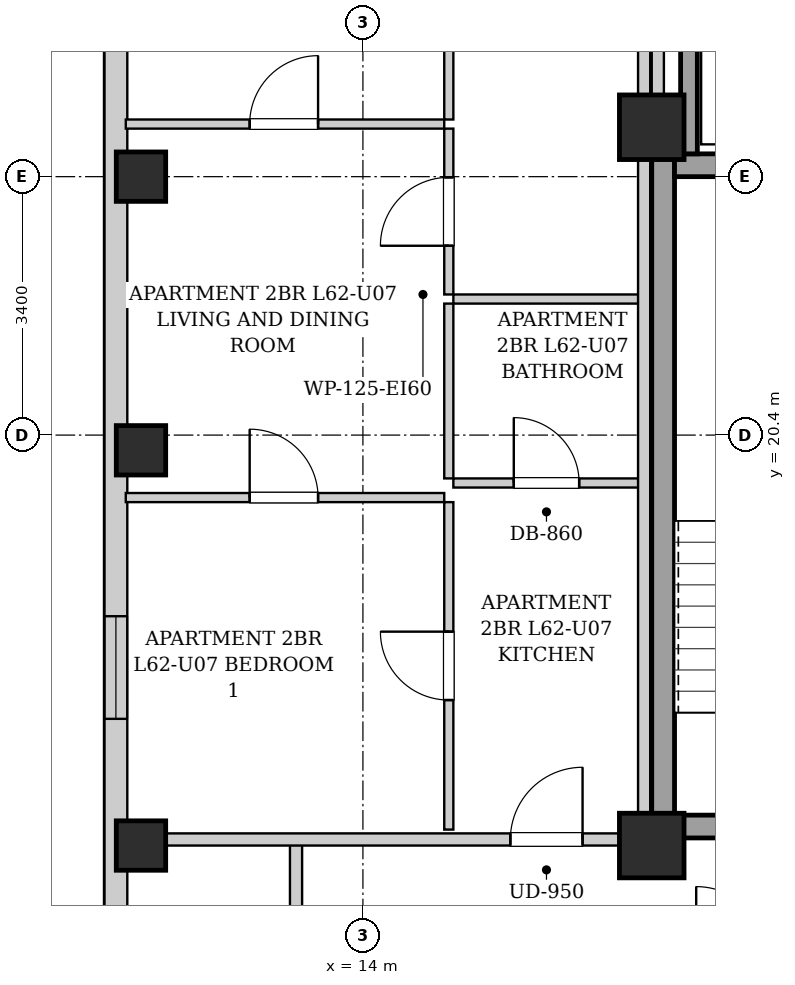
"""IFC4 building model, lengths in metres.
Left out: names, types, materials, properties, quantities, classifications, styles, units other than length and angle.
Written with IfcOpenShell. Run it as: python <this file> out.ifc"""

import sys

from ifc_helpers import new_model, si_unit, direction, frame, frame_2d, origin, origin_2d, place, context, subcontext, project, spatial, rectangle, extrude, element, fill, save


model = new_model("IFC4")
c1 = context("Model", 3, precision=1e-05, world=origin(), true_north=direction((0.0, 1.0)))
c2 = subcontext(c1, "Body", "Model", "MODEL_VIEW")
j1 = project(units=[si_unit("LENGTHUNIT", "METRE"), si_unit("PLANEANGLEUNIT", "RADIAN")], contexts=[c1])
p1 = place(None, origin())
s1 = spatial("IfcSite", under=j1, at=p1, CompositionType="ELEMENT")
p2 = place(p1, origin())
s2 = spatial("IfcBuilding", under=s1, at=p2, CompositionType="ELEMENT")
p3 = place(p2, frame((0.0, 0.0, 214.0)))
s3 = spatial("IfcBuildingStorey", under=s2, at=p3, CompositionType="ELEMENT", Elevation=214.0)
for number, where, z_axis, x_axis in (
    (1, (11.08, 15.0, 0.0), (0.0, 0.0, 1.0), (1.0, 0.0, 0.0)),
    (2, (11.08, 20.2, 0.0), (0.0, 0.0, 1.0), (1.0, 0.0, 0.0)),
    (3, (11.08, 23.8, 0.0), (0.0, 0.0, 1.0), (1.0, 0.0, 0.0)),
):
    element("IfcColumn", number, at=place(p3, frame(where, z_axis=z_axis, x_axis=x_axis)), inside=s3, PredefinedType="COLUMN", context=c2, shape_type="SweptSolid", body=[
        extrude(rectangle(XDim=0.65, YDim=0.65, at=origin_2d()), origin(), (0.0, 0.0, 1.0), 3.3),
    ])
for number, where, z_axis, x_axis in (
    (4, (17.8, 15.0, 0.0), (0.0, 0.0, 1.0), (1.0, 0.0, 0.0)),
    (5, (17.8, 24.45, 0.0), (0.0, 0.0, 1.0), (1.0, 0.0, 0.0)),
):
    element("IfcColumn", number, at=place(p3, frame(where, z_axis=z_axis, x_axis=x_axis)), inside=s3, PredefinedType="COLUMN", context=c2, shape_type="SweptSolid", body=[
        extrude(rectangle(XDim=0.85, YDim=0.85, at=origin_2d()), origin(), (0.0, 0.0, 1.0), 3.3),
    ])
p4 = place(p3, frame((10.75, 6.3, 0.0), z_axis=(0.0, 0.0, 1.0), x_axis=(0.0, 1.0, 0.0)))
e6 = element("IfcWall", 6, at=p4, inside=s3, PredefinedType="SOLIDWALL", context=c2, shape_type="SweptSolid", body=[
    extrude(rectangle(XDim=31.4, YDim=0.3, at=frame_2d((15.7, 0.0))), origin(), (0.0, 0.0, 1.0), 3.04),
])
p5 = place(p4, frame((28.396, 0.0, 0.55)))
e7 = element("IfcOpeningElement", 7, at=p5, cuts=e6, PredefinedType="OPENING", context=c2, shape_type="SweptSolid", body=[
    extrude(rectangle(XDim=1.35, YDim=1.2, at=frame_2d((0.675, 0.6))), frame((0.0, 0.16, 0.0), z_axis=(0.0, -1.0, 0.0), x_axis=(1.0, 0.0, 0.0)), (0.0, 0.0, 1.0), 0.32),
])
p6 = place(p4, frame((10.367, 0.0, 0.55)))
e8 = element("IfcOpeningElement", 8, at=p6, cuts=e6, PredefinedType="OPENING", context=c2, shape_type="SweptSolid", body=[
    extrude(rectangle(XDim=1.35, YDim=1.2, at=frame_2d((0.675, 0.6))), frame((0.0, 0.16, 0.0), z_axis=(0.0, -1.0, 0.0), x_axis=(1.0, 0.0, 0.0)), (0.0, 0.0, 1.0), 0.32),
])
p7 = place(p4, frame((19.683, 0.0, 0.55)))
e9 = element("IfcOpeningElement", 9, at=p7, cuts=e6, PredefinedType="OPENING", context=c2, shape_type="SweptSolid", body=[
    extrude(rectangle(XDim=1.35, YDim=1.2, at=frame_2d((0.675, 0.6))), frame((0.0, 0.16, 0.0), z_axis=(0.0, -1.0, 0.0), x_axis=(1.0, 0.0, 0.0)), (0.0, 0.0, 1.0), 0.32),
])
p8 = place(p3, frame((17.95, 15.1, 0.0), z_axis=(0.0, 0.0, 1.0), x_axis=(0.0, 1.0, 0.0)))
e10 = element("IfcWall", 10, at=p8, inside=s3, PredefinedType="SHEAR", context=c2, shape_type="SweptSolid", body=[
    extrude(rectangle(XDim=9.0, YDim=0.3, at=frame_2d((4.5, 0.0))), origin(), (0.0, 0.0, 1.0), 3.04),
])
p9 = place(p3, frame((18.1, 23.95, 0.0), z_axis=(0.0, 0.0, 1.0), x_axis=(1.0, 0.0, 0.0)))
e11 = element("IfcWall", 11, at=p9, inside=s3, PredefinedType="SHEAR", context=c2, shape_type="SweptSolid", body=[
    extrude(rectangle(XDim=2.85, YDim=0.3, at=frame_2d((1.425, 0.0))), origin(), (0.0, 0.0, 1.0), 3.04),
])
p10 = place(p3, frame((18.1, 15.25, 0.0), z_axis=(0.0, 0.0, 1.0), x_axis=(1.0, 0.0, 0.0)))
e12 = element("IfcWall", 12, at=p10, inside=s3, PredefinedType="SHEAR", context=c2, shape_type="SweptSolid", body=[
    extrude(rectangle(XDim=2.85, YDim=0.3, at=frame_2d((1.425, 0.0))), origin(), (0.0, 0.0, 1.0), 3.04),
])
p11 = place(p10, frame((0.86, 0.0, 0.0)))
e13 = element("IfcOpeningElement", 13, at=p11, cuts=e12, PredefinedType="OPENING", context=c2, shape_type="SweptSolid", body=[
    extrude(rectangle(XDim=1.1, YDim=2.05, at=frame_2d((0.55, 1.025))), frame((0.0, 0.16, 0.0), z_axis=(0.0, -1.0, 0.0), x_axis=(1.0, 0.0, 0.0)), (0.0, 0.0, 1.0), 0.32),
])
p12 = place(p3, frame((18.29, 24.1, 0.0), z_axis=(0.0, 0.0, 1.0), x_axis=(0.0, 1.0, 0.0)))
e14 = element("IfcWall", 14, at=p12, inside=s3, PredefinedType="SHEAR", context=c2, shape_type="SweptSolid", body=[
    extrude(rectangle(XDim=4.14, YDim=0.22, at=frame_2d((2.07, 0.0))), origin(), (0.0, 0.0, 1.0), 3.04),
])
p13 = place(p3, frame((17.88, 24.12, 0.0), z_axis=(0.0, 0.0, 1.0), x_axis=(0.0, 1.0, 0.0)))
e15 = element("IfcWall", 15, at=p13, inside=s3, PredefinedType="PARTITIONING", context=c2, shape_type="SweptSolid", body=[
    extrude(rectangle(XDim=4.76, YDim=0.16, at=frame_2d((2.38, 0.0))), origin(), (0.0, 0.0, 1.0), 3.04),
])
p14 = place(p3, frame((13.12, 13.51, 0.0), z_axis=(0.0, 0.0, 1.0), x_axis=(0.0, 1.0, 0.0)))
e16 = element("IfcWall", 16, at=p14, inside=s3, PredefinedType="PARTITIONING", context=c2, shape_type="SweptSolid", body=[
    extrude(rectangle(XDim=1.58, YDim=0.16, at=frame_2d((0.79, 0.0))), origin(), (0.0, 0.0, 1.0), 3.04),
])
p15 = place(p3, frame((10.88, 15.08, 0.0), z_axis=(0.0, 0.0, 1.0), x_axis=(1.0, 0.0, 0.0)))
e17 = element("IfcWall", 17, at=p15, inside=s3, PredefinedType="PARTITIONING", context=c2, shape_type="SweptSolid", body=[
    extrude(rectangle(XDim=6.88, YDim=0.16, at=frame_2d((3.44, 0.0))), origin(), (0.0, 0.0, 1.0), 2.556),
])
p16 = place(p15, frame((5.06, 0.0, 0.0)))
e18 = element("IfcOpeningElement", 18, at=p16, cuts=e17, PredefinedType="OPENING", context=c2, shape_type="SweptSolid", body=[
    extrude(rectangle(XDim=0.95, YDim=2.1, at=frame_2d((0.475, 1.05))), frame((0.0, 0.09, 0.0), z_axis=(0.0, -1.0, 0.0), x_axis=(1.0, 0.0, 0.0)), (0.0, 0.0, 1.0), 0.18),
])
p17 = place(p3, frame((15.19, 22.19, 0.0), z_axis=(0.0, 0.0, 1.0), x_axis=(1.0, 0.0, 0.0)))
e19 = element("IfcWall", 19, at=p17, inside=s3, PredefinedType="PARTITIONING", context=c2, shape_type="SweptSolid", body=[
    extrude(rectangle(XDim=2.45, YDim=0.12, at=frame_2d((1.225, 0.0))), origin(), (0.0, 0.0, 1.0), 3.04),
])
p18 = place(p3, frame((15.13, 22.25, 0.0), z_axis=(0.0, 0.0, 1.0), x_axis=(0.0, 1.0, 0.0)))
e20 = element("IfcWall", 20, at=p18, inside=s3, PredefinedType="PARTITIONING", context=c2, shape_type="SweptSolid", body=[
    extrude(rectangle(XDim=2.182, YDim=0.12, at=frame_2d((1.091, 0.0))), origin(), (0.0, 0.0, 1.0), 3.04),
])
p19 = place(p18, frame((0.641, 0.0, 0.0)))
e21 = element("IfcOpeningElement", 21, at=p19, cuts=e20, PredefinedType="OPENING", context=c2, shape_type="SweptSolid", body=[
    extrude(rectangle(XDim=0.9, YDim=2.05, at=frame_2d((0.45, 1.025))), frame((0.0, 0.07, 0.0), z_axis=(0.0, -1.0, 0.0), x_axis=(1.0, 0.0, 0.0)), (0.0, 0.0, 1.0), 0.14),
])
p20 = place(p3, frame((15.13, 24.552, 0.0), z_axis=(0.0, 0.0, 1.0), x_axis=(0.0, 1.0, 0.0)))
e22 = element("IfcWall", 22, at=p20, inside=s3, PredefinedType="PARTITIONING", context=c2, shape_type="SweptSolid", body=[
    extrude(rectangle(XDim=4.308, YDim=0.12, at=frame_2d((2.154, 0.0))), origin(), (0.0, 0.0, 1.0), 3.04),
])
p21 = place(p20, frame((1.704, 0.0, 0.0)))
e23 = element("IfcOpeningElement", 23, at=p21, cuts=e22, PredefinedType="OPENING", context=c2, shape_type="SweptSolid", body=[
    extrude(rectangle(XDim=0.9, YDim=2.05, at=frame_2d((0.45, 1.025))), frame((0.0, 0.07, 0.0), z_axis=(0.0, -1.0, 0.0), x_axis=(1.0, 0.0, 0.0)), (0.0, 0.0, 1.0), 0.14),
])
p22 = place(p3, frame((15.19, 19.77, 0.0), z_axis=(0.0, 0.0, 1.0), x_axis=(1.0, 0.0, 0.0)))
e24 = element("IfcWall", 24, at=p22, inside=s3, PredefinedType="PARTITIONING", context=c2, shape_type="SweptSolid", body=[
    extrude(rectangle(XDim=2.45, YDim=0.12, at=frame_2d((1.225, 0.0))), origin(), (0.0, 0.0, 1.0), 3.04),
])
p23 = place(p22, frame((0.795, 0.0, 0.0)))
e25 = element("IfcOpeningElement", 25, at=p23, cuts=e24, PredefinedType="OPENING", context=c2, shape_type="SweptSolid", body=[
    extrude(rectangle(XDim=0.86, YDim=2.05, at=frame_2d((0.43, 1.025))), frame((0.0, 0.07, 0.0), z_axis=(0.0, -1.0, 0.0), x_axis=(1.0, 0.0, 0.0)), (0.0, 0.0, 1.0), 0.14),
])
p24 = place(p3, frame((15.13, 19.83, 0.0), z_axis=(0.0, 0.0, 1.0), x_axis=(0.0, 1.0, 0.0)))
e26 = element("IfcWall", 26, at=p24, inside=s3, PredefinedType="PARTITIONING", context=c2, shape_type="SweptSolid", body=[
    extrude(rectangle(XDim=2.3, YDim=0.12, at=frame_2d((1.15, 0.0))), origin(), (0.0, 0.0, 1.0), 3.04),
])
p25 = place(p3, frame((15.13, 15.21, 0.0), z_axis=(0.0, 0.0, 1.0), x_axis=(0.0, 1.0, 0.0)))
e27 = element("IfcWall", 27, at=p25, inside=s3, PredefinedType="PARTITIONING", context=c2, shape_type="SweptSolid", body=[
    extrude(rectangle(XDim=4.308, YDim=0.12, at=frame_2d((2.154, 0.0))), origin(), (0.0, 0.0, 1.0), 3.04),
])
p26 = place(p25, frame((1.704, 0.0, 0.0)))
e28 = element("IfcOpeningElement", 28, at=p26, cuts=e27, PredefinedType="OPENING", context=c2, shape_type="SweptSolid", body=[
    extrude(rectangle(XDim=0.9, YDim=2.05, at=frame_2d((0.45, 1.025))), frame((0.0, 0.07, 0.0), z_axis=(0.0, -1.0, 0.0), x_axis=(1.0, 0.0, 0.0)), (0.0, 0.0, 1.0), 0.14),
])
p27 = place(p3, frame((10.88, 19.578, 0.0), z_axis=(0.0, 0.0, 1.0), x_axis=(1.0, 0.0, 0.0)))
e29 = element("IfcWall", 29, at=p27, inside=s3, PredefinedType="PARTITIONING", context=c2, shape_type="SweptSolid", body=[
    extrude(rectangle(XDim=4.19, YDim=0.12, at=frame_2d((2.095, 0.0))), origin(), (0.0, 0.0, 1.0), 3.04),
])
p28 = place(p27, frame((1.63, 0.0, 0.0)))
e30 = element("IfcOpeningElement", 30, at=p28, cuts=e29, PredefinedType="OPENING", context=c2, shape_type="SweptSolid", body=[
    extrude(rectangle(XDim=0.9, YDim=2.05, at=frame_2d((0.45, 1.025))), frame((0.0, 0.07, 0.0), z_axis=(0.0, -1.0, 0.0), x_axis=(1.0, 0.0, 0.0)), (0.0, 0.0, 1.0), 0.14),
])
p29 = place(p3, frame((10.88, 24.492, 0.0), z_axis=(0.0, 0.0, 1.0), x_axis=(1.0, 0.0, 0.0)))
e31 = element("IfcWall", 31, at=p29, inside=s3, PredefinedType="PARTITIONING", context=c2, shape_type="SweptSolid", body=[
    extrude(rectangle(XDim=4.19, YDim=0.12, at=frame_2d((2.095, 0.0))), origin(), (0.0, 0.0, 1.0), 2.722),
])
p30 = place(p29, frame((1.63, 0.0, 0.0)))
e32 = element("IfcOpeningElement", 32, at=p30, cuts=e31, PredefinedType="OPENING", context=c2, shape_type="SweptSolid", body=[
    extrude(rectangle(XDim=0.9, YDim=2.05, at=frame_2d((0.45, 1.025))), frame((0.0, 0.07, 0.0), z_axis=(0.0, -1.0, 0.0), x_axis=(1.0, 0.0, 0.0)), (0.0, 0.0, 1.0), 0.14),
])
p31 = place(p3, frame((17.7, 15.02, 0.0), z_axis=(0.0, 0.0, 1.0), x_axis=(0.0, 1.0, 0.0)))
e33 = element("IfcWall", 33, at=p31, inside=s3, PredefinedType="PARTITIONING", context=c2, shape_type="SweptSolid", body=[
    extrude(rectangle(XDim=13.98, YDim=0.16, at=frame_2d((6.99, 0.0))), origin(), (0.0, 0.0, 1.0), 3.04),
])
p32 = place(p16, origin())
e34 = element("IfcDoor", 34, at=p32, inside=s3, OperationType="SINGLE_SWING_RIGHT", PredefinedType="DOOR", context=c2, shape_type="SweptSolid", body=[
    extrude(rectangle(XDim=0.95, YDim=2.1, at=frame_2d((0.475, 1.05))), frame((0.0, 0.025, 0.0), z_axis=(0.0, -1.0, 0.0), x_axis=(1.0, 0.0, 0.0)), (0.0, 0.0, 1.0), 0.05),
])
fill(e18, e34)
p33 = place(p19, origin())
e35 = element("IfcDoor", 35, at=p33, inside=s3, OperationType="SINGLE_SWING_LEFT", PredefinedType="DOOR", context=c2, shape_type="SweptSolid", body=[
    extrude(rectangle(XDim=0.9, YDim=2.05, at=frame_2d((0.45, 1.025))), frame((0.0, 0.025, 0.0), z_axis=(0.0, -1.0, 0.0), x_axis=(1.0, 0.0, 0.0)), (0.0, 0.0, 1.0), 0.05),
])
fill(e21, e35)
p34 = place(p23, origin())
e36 = element("IfcDoor", 36, at=p34, inside=s3, OperationType="SINGLE_SWING_LEFT", PredefinedType="DOOR", context=c2, shape_type="SweptSolid", body=[
    extrude(rectangle(XDim=0.86, YDim=2.05, at=frame_2d((0.43, 1.025))), frame((0.0, 0.025, 0.0), z_axis=(0.0, -1.0, 0.0), x_axis=(1.0, 0.0, 0.0)), (0.0, 0.0, 1.0), 0.05),
])
fill(e25, e36)
p35 = place(p26, origin())
e37 = element("IfcDoor", 37, at=p35, inside=s3, OperationType="SINGLE_SWING_RIGHT", PredefinedType="DOOR", context=c2, shape_type="SweptSolid", body=[
    extrude(rectangle(XDim=0.9, YDim=2.05, at=frame_2d((0.45, 1.025))), frame((0.0, 0.025, 0.0), z_axis=(0.0, -1.0, 0.0), x_axis=(1.0, 0.0, 0.0)), (0.0, 0.0, 1.0), 0.05),
])
fill(e28, e37)
p36 = place(p28, origin())
e38 = element("IfcDoor", 38, at=p36, inside=s3, OperationType="SINGLE_SWING_LEFT", PredefinedType="DOOR", context=c2, shape_type="SweptSolid", body=[
    extrude(rectangle(XDim=0.9, YDim=2.05, at=frame_2d((0.45, 1.025))), frame((0.0, 0.025, 0.0), z_axis=(0.0, -1.0, 0.0), x_axis=(1.0, 0.0, 0.0)), (0.0, 0.0, 1.0), 0.05),
])
fill(e30, e38)
p37 = place(p30, origin())
e39 = element("IfcDoor", 39, at=p37, inside=s3, OperationType="SINGLE_SWING_RIGHT", PredefinedType="DOOR", context=c2, shape_type="SweptSolid", body=[
    extrude(rectangle(XDim=0.9, YDim=2.05, at=frame_2d((0.45, 1.025))), frame((0.0, 0.025, 0.0), z_axis=(0.0, -1.0, 0.0), x_axis=(1.0, 0.0, 0.0)), (0.0, 0.0, 1.0), 0.05),
])
fill(e32, e39)
p38 = place(p6, origin())
e40 = element("IfcWindow", 40, at=p38, inside=s3, PartitioningType="SINGLE_PANEL", PredefinedType="WINDOW", context=c2, shape_type="SweptSolid", body=[
    extrude(rectangle(XDim=1.35, YDim=1.2, at=frame_2d((0.675, 0.6))), frame((0.0, 0.03, 0.0), z_axis=(0.0, -1.0, 0.0), x_axis=(1.0, 0.0, 0.0)), (0.0, 0.0, 1.0), 0.06),
])
fill(e8, e40)
save(model, sys.argv[1])
